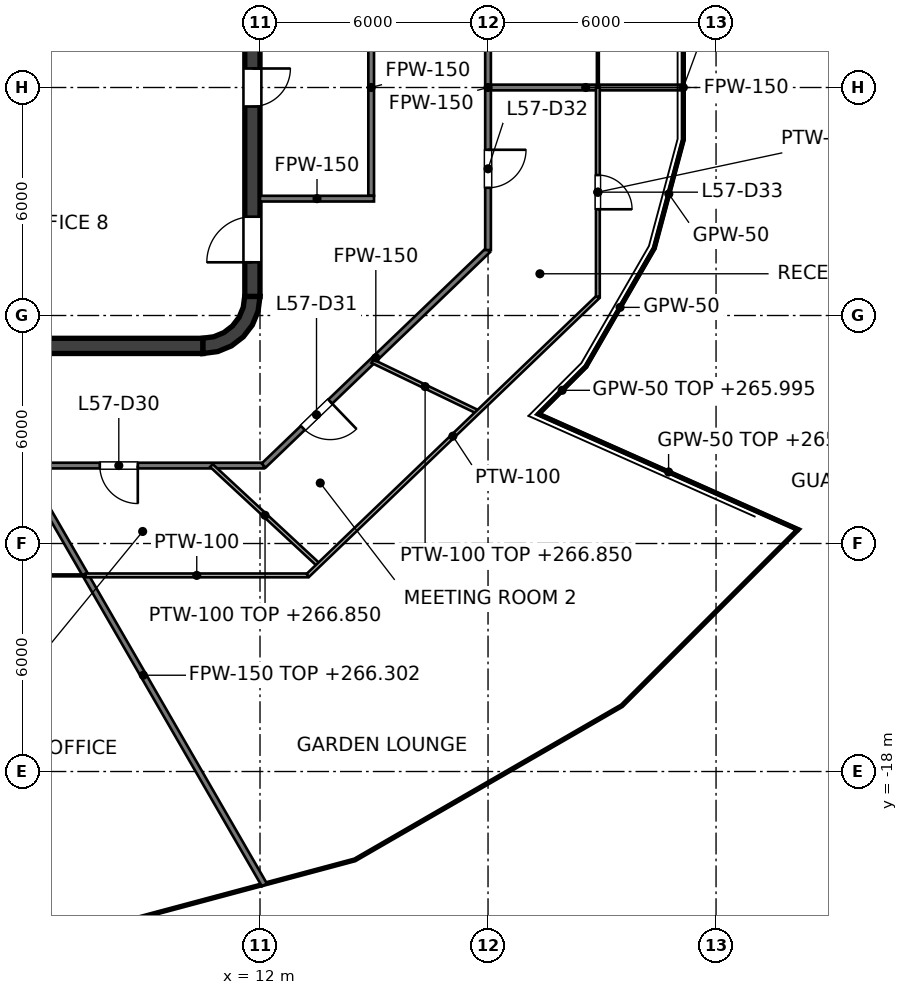
"""IFC4 building model, lengths in metres.
Left out: names, types, materials, properties, quantities, classifications, styles, units other than length and angle.
Written with IfcOpenShell. Run it as: python <this file> out.ifc"""

import sys

from ifc_helpers import new_model, si_unit, direction, frame, frame_2d, origin, place, context, subcontext, project, spatial, polyline, rectangle, outline, extrude, element, fill, save


model = new_model("IFC4")
c1 = context("Model", 3, precision=1e-05, world=origin(), true_north=direction((0.0, 1.0)))
c2 = subcontext(c1, "Body", "Model", "MODEL_VIEW")
j1 = project(units=[si_unit("LENGTHUNIT", "METRE"), si_unit("PLANEANGLEUNIT", "RADIAN")], contexts=[c1])
p1 = place(None, origin())
s1 = spatial("IfcSite", under=j1, at=p1, CompositionType="ELEMENT")
p2 = place(p1, origin())
s2 = spatial("IfcBuilding", under=s1, at=p2, CompositionType="ELEMENT")
p3 = place(p2, frame((0.0, 0.0, 263.0)))
s3 = spatial("IfcBuildingStorey", under=s2, at=p3, CompositionType="ELEMENT", Elevation=263.0)
p4 = place(p3, frame((-10.5, -6.8, 0.0), z_axis=(0.0, 0.0, 1.0), x_axis=(1.0, 0.0, 0.0)))
e1 = element("IfcWall", 1, at=p4, inside=s3, PredefinedType="SHEAR", context=c2, shape_type="SweptSolid", body=[
    extrude(rectangle(XDim=21.0, YDim=0.4, at=frame_2d((10.5, 0.0))), origin(), (0.0, 0.0, 1.0), 4.0),
])
p5 = place(p3, frame((11.8, -5.5, 0.0), z_axis=(0.0, 0.0, 1.0), x_axis=(0.0, 1.0, 0.0)))
e2 = element("IfcWall", 2, at=p5, inside=s3, PredefinedType="SHEAR", context=c2, shape_type="SweptSolid", body=[
    extrude(rectangle(XDim=11.0, YDim=0.4, at=frame_2d((5.5, 0.0))), origin(), (0.0, 0.0, 1.0), 4.0),
])
p6 = place(p5, frame((5.0, 0.0, 0.0)))
e3 = element("IfcOpeningElement", 3, at=p6, cuts=e2, PredefinedType="OPENING", context=c2, shape_type="SweptSolid", body=[
    extrude(rectangle(XDim=1.0, YDim=2.1, at=frame_2d((0.5, 1.05))), frame((0.0, 0.2, 0.0), z_axis=(0.0, -1.0, 0.0), x_axis=(1.0, 0.0, 0.0)), (0.0, 0.0, 1.0), 0.4),
])
p7 = place(p5, frame((0.9, 0.0, 0.0)))
e4 = element("IfcOpeningElement", 4, at=p7, cuts=e2, PredefinedType="OPENING", context=c2, shape_type="SweptSolid", body=[
    extrude(rectangle(XDim=1.2, YDim=2.1, at=frame_2d((0.6, 1.05))), frame((0.0, 0.2, 0.0), z_axis=(0.0, -1.0, 0.0), x_axis=(1.0, 0.0, 0.0)), (0.0, 0.0, 1.0), 0.4),
])
p8 = place(p5, frame((8.9, 0.0, 0.0)))
e5 = element("IfcOpeningElement", 5, at=p8, cuts=e2, PredefinedType="OPENING", context=c2, shape_type="SweptSolid", body=[
    extrude(rectangle(XDim=1.2, YDim=2.1, at=frame_2d((0.6, 1.05))), frame((0.0, 0.2, 0.0), z_axis=(0.0, -1.0, 0.0), x_axis=(1.0, 0.0, 0.0)), (0.0, 0.0, 1.0), 0.4),
])
p9 = place(p3, origin())
e6 = element("IfcWall", 6, at=p9, inside=s3, PredefinedType="SHEAR", context=c2, shape_type="SweptSolid", body=[
    extrude(outline(polyline([(12.0, -5.5), (11.596, -5.5), (11.559, -5.784), (11.45, -6.048), (11.275, -6.275), (11.048, -6.45), (10.784, -6.559), (10.5, -6.596), (10.5, -7.0), (10.888, -6.949), (11.25, -6.799), (11.561, -6.561), (11.799, -6.25), (11.949, -5.888), (12.0, -5.5)])), origin(), (0.0, 0.0, 1.0), 4.0),
])
p10 = place(p3, frame((9.0, -6.6, 0.0), z_axis=(0.0, 0.0, 1.0), x_axis=(0.0, 1.0, 0.0)))
e7 = element("IfcWall", 7, at=p10, inside=s3, PredefinedType="SOLIDWALL", context=c2, shape_type="SweptSolid", body=[
    extrude(rectangle(XDim=2.5, YDim=0.25, at=frame_2d((1.25, 0.0))), origin(), (0.0, 0.0, 1.0), 3.85),
])
p11 = place(p10, frame((0.65, 0.0, 0.0)))
e8 = element("IfcOpeningElement", 8, at=p11, cuts=e7, PredefinedType="OPENING", context=c2, shape_type="SweptSolid", body=[
    extrude(rectangle(XDim=1.2, YDim=2.1, at=frame_2d((0.6, 1.05))), frame((0.0, 0.125, 0.0), z_axis=(0.0, -1.0, 0.0), x_axis=(1.0, 0.0, 0.0)), (0.0, 0.0, 1.0), 0.25),
])
p12 = place(p3, frame((-9.125, -1.525, 0.0), z_axis=(0.0, 0.0, 1.0), x_axis=(1.0, 0.0, 0.0)))
e9 = element("IfcWall", 9, at=p12, inside=s3, PredefinedType="SOLIDWALL", context=c2, shape_type="SweptSolid", body=[
    extrude(rectangle(XDim=18.25, YDim=0.25, at=frame_2d((9.125, 0.0))), origin(), (0.0, 0.0, 1.0), 3.85),
])
p13 = place(p12, frame((7.15, 0.0, 0.0)))
e10 = element("IfcOpeningElement", 10, at=p13, cuts=e9, PredefinedType="OPENING", context=c2, shape_type="SweptSolid", body=[
    extrude(rectangle(XDim=1.2, YDim=2.1, at=frame_2d((0.6, 1.05))), frame((0.0, 0.125, 0.0), z_axis=(0.0, -1.0, 0.0), x_axis=(1.0, 0.0, 0.0)), (0.0, 0.0, 1.0), 0.25),
])
p14 = place(p12, frame((10.2, 0.0, 0.0)))
e11 = element("IfcOpeningElement", 11, at=p14, cuts=e9, PredefinedType="OPENING", context=c2, shape_type="SweptSolid", body=[
    extrude(rectangle(XDim=1.2, YDim=2.1, at=frame_2d((0.6, 1.05))), frame((0.0, 0.125, 0.0), z_axis=(0.0, -1.0, 0.0), x_axis=(1.0, 0.0, 0.0)), (0.0, 0.0, 1.0), 0.25),
])
p15 = place(p12, frame((16.075, 0.0, 0.0)))
e12 = element("IfcOpeningElement", 12, at=p15, cuts=e9, PredefinedType="OPENING", context=c2, shape_type="SweptSolid", body=[
    extrude(rectangle(XDim=1.0, YDim=2.1, at=frame_2d((0.5, 1.05))), frame((0.0, 0.125, 0.0), z_axis=(0.0, -1.0, 0.0), x_axis=(1.0, 0.0, 0.0)), (0.0, 0.0, 1.0), 0.25),
])
p16 = place(p3, frame((3.275, -3.975, 0.0), z_axis=(0.0, 0.0, 1.0), x_axis=(1.0, 0.0, 0.0)))
e13 = element("IfcWall", 13, at=p16, inside=s3, PredefinedType="SOLIDWALL", context=c2, shape_type="SweptSolid", body=[
    extrude(rectangle(XDim=5.85, YDim=0.25, at=frame_2d((2.925, 0.0))), origin(), (0.0, 0.0, 1.0), 3.85),
])
p17 = place(p3, frame((9.0, -3.85, 0.0), z_axis=(0.0, 0.0, 1.0), x_axis=(0.0, 1.0, 0.0)))
e14 = element("IfcWall", 14, at=p17, inside=s3, PredefinedType="SOLIDWALL", context=c2, shape_type="SweptSolid", body=[
    extrude(rectangle(XDim=2.2, YDim=0.25, at=frame_2d((1.1, 0.0))), origin(), (0.0, 0.0, 1.0), 3.85),
])
p18 = place(p3, frame((14.925, -2.85, 0.0), z_axis=(0.0, 0.0, 1.0), x_axis=(0.0, 1.0, 0.0)))
e15 = element("IfcWall", 15, at=p18, inside=s3, PredefinedType="PARTITIONING", context=c2, shape_type="SweptSolid", body=[
    extrude(rectangle(XDim=5.7, YDim=0.15, at=frame_2d((2.85, 0.0))), origin(), (0.0, 0.0, 1.0), 2.918),
])
p19 = place(p3, frame((12.0, -2.925, 0.0), z_axis=(0.0, 0.0, 1.0), x_axis=(1.0, 0.0, 0.0)))
e16 = element("IfcWall", 16, at=p19, inside=s3, PredefinedType="PARTITIONING", context=c2, shape_type="SweptSolid", body=[
    extrude(rectangle(XDim=3.0, YDim=0.15, at=frame_2d((1.5, 0.0))), origin(), (0.0, 0.0, 1.0), 2.918),
])
p20 = place(p3, frame((5.744, -9.949, 0.0), z_axis=(0.0, 0.0, 1.0), x_axis=(0.500041996576, -0.866001155692, 0.0)))
e17 = element("IfcWall", 17, at=p20, inside=s3, PredefinedType="PARTITIONING", context=c2, shape_type="SweptSolid", body=[
    extrude(rectangle(XDim=12.742, YDim=0.15, at=frame_2d((6.371, 0.0))), origin(), (0.0, 0.0, 1.0), 3.302),
])
p21 = place(p3, frame((-12.095, -9.949, 0.0), z_axis=(0.0, 0.0, 1.0), x_axis=(1.0, 0.0, 0.0)))
e18 = element("IfcWall", 18, at=p21, inside=s3, PredefinedType="PARTITIONING", context=c2, shape_type="SweptSolid", body=[
    extrude(rectangle(XDim=24.19, YDim=0.15, at=frame_2d((12.095, 0.0))), origin(), (0.0, 0.0, 1.0), 2.927),
])
p22 = place(p21, frame((0.573, 0.0, 0.0)))
e19 = element("IfcOpeningElement", 19, at=p22, cuts=e18, PredefinedType="OPENING", context=c2, shape_type="SweptSolid", body=[
    extrude(rectangle(XDim=1.0, YDim=2.1, at=frame_2d((0.5, 1.05))), frame((0.0, 0.075, 0.0), z_axis=(0.0, -1.0, 0.0), x_axis=(1.0, 0.0, 0.0)), (0.0, 0.0, 1.0), 0.15),
])
p23 = place(p21, frame((5.966, 0.0, 0.0)))
e20 = element("IfcOpeningElement", 20, at=p23, cuts=e18, PredefinedType="OPENING", context=c2, shape_type="SweptSolid", body=[
    extrude(rectangle(XDim=1.0, YDim=2.1, at=frame_2d((0.5, 1.05))), frame((0.0, 0.075, 0.0), z_axis=(0.0, -1.0, 0.0), x_axis=(1.0, 0.0, 0.0)), (0.0, 0.0, 1.0), 0.15),
])
p24 = place(p21, frame((13.812, 0.0, 0.0)))
e21 = element("IfcOpeningElement", 21, at=p24, cuts=e18, PredefinedType="OPENING", context=c2, shape_type="SweptSolid", body=[
    extrude(rectangle(XDim=1.0, YDim=2.1, at=frame_2d((0.5, 1.05))), frame((0.0, 0.075, 0.0), z_axis=(0.0, -1.0, 0.0), x_axis=(1.0, 0.0, 0.0)), (0.0, 0.0, 1.0), 0.15),
])
p25 = place(p21, frame((19.879, 0.0, 0.0)))
e22 = element("IfcOpeningElement", 22, at=p25, cuts=e18, PredefinedType="OPENING", context=c2, shape_type="SweptSolid", body=[
    extrude(rectangle(XDim=1.0, YDim=2.1, at=frame_2d((0.5, 1.05))), frame((0.0, 0.075, 0.0), z_axis=(0.0, -1.0, 0.0), x_axis=(1.0, 0.0, 0.0)), (0.0, 0.0, 1.0), 0.15),
])
p26 = place(p3, frame((18.0, 0.0, 0.0), z_axis=(0.0, 0.0, 1.0), x_axis=(1.0, 0.0, 0.0)))
e23 = element("IfcWall", 23, at=p26, inside=s3, PredefinedType="PARTITIONING", context=c2, shape_type="SweptSolid", body=[
    extrude(rectangle(XDim=5.139, YDim=0.15, at=frame_2d((2.569, 0.0))), origin(), (0.0, 0.0, 1.0), 2.918),
])
p27 = place(p3, frame((12.095, -9.949, 0.0), z_axis=(0.0, 0.0, 1.0), x_axis=(0.721260976692, 0.69266341285, 0.0)))
e24 = element("IfcWall", 24, at=p27, inside=s3, PredefinedType="PARTITIONING", context=c2, shape_type="SweptSolid", body=[
    extrude(rectangle(XDim=8.187, YDim=0.15, at=frame_2d((4.094, 0.0))), origin(), (0.0, 0.0, 1.0), 2.918),
])
p28 = place(p27, frame((1.43, 0.0, 0.0)))
e25 = element("IfcOpeningElement", 25, at=p28, cuts=e24, PredefinedType="OPENING", context=c2, shape_type="SweptSolid", body=[
    extrude(rectangle(XDim=1.0, YDim=2.1, at=frame_2d((0.5, 1.05))), frame((0.0, 0.075, 0.0), z_axis=(0.0, -1.0, 0.0), x_axis=(1.0, 0.0, 0.0)), (0.0, 0.0, 1.0), 0.15),
])
p29 = place(p3, frame((18.0, -4.278, 0.0), z_axis=(0.0, 0.0, 1.0), x_axis=(0.0, 1.0, 0.0)))
e26 = element("IfcWall", 26, at=p29, inside=s3, PredefinedType="PARTITIONING", context=c2, shape_type="SweptSolid", body=[
    extrude(rectangle(XDim=8.556, YDim=0.15, at=frame_2d((4.278, 0.0))), origin(), (0.0, 0.0, 1.0), 2.918),
])
p30 = place(p29, frame((1.639, 0.0, 0.0)))
e27 = element("IfcOpeningElement", 27, at=p30, cuts=e26, PredefinedType="OPENING", context=c2, shape_type="SweptSolid", body=[
    extrude(rectangle(XDim=1.0, YDim=2.1, at=frame_2d((0.5, 1.05))), frame((0.0, 0.075, 0.0), z_axis=(0.0, -1.0, 0.0), x_axis=(1.0, 0.0, 0.0)), (0.0, 0.0, 1.0), 0.15),
])
p31 = place(p29, frame((5.917, 0.0, 0.0)))
e28 = element("IfcOpeningElement", 28, at=p31, cuts=e26, PredefinedType="OPENING", context=c2, shape_type="SweptSolid", body=[
    extrude(rectangle(XDim=1.0, YDim=2.1, at=frame_2d((0.5, 1.05))), frame((0.0, 0.075, 0.0), z_axis=(0.0, -1.0, 0.0), x_axis=(1.0, 0.0, 0.0)), (0.0, 0.0, 1.0), 0.15),
])
p32 = place(p3, frame((19.325, -8.594, 0.0), z_axis=(0.0, 0.0, 1.0), x_axis=(0.913724263299, -0.406334801191, 0.0)))
e29 = element("IfcWall", 29, at=p32, inside=s3, PredefinedType="PARTITIONING", context=c2, shape_type="SweptSolid", body=[
    extrude(rectangle(XDim=7.499, YDim=0.05, at=frame_2d((3.75, 0.0))), origin(), (0.0, 0.0, 1.0), 2.995),
])
p33 = place(p3, frame((-12.839, -12.839, 0.0), z_axis=(0.0, 0.0, 1.0), x_axis=(1.0, 0.0, 0.0)))
e30 = element("IfcWall", 30, at=p33, inside=s3, PredefinedType="PARTITIONING", context=c2, shape_type="SweptSolid", body=[
    extrude(rectangle(XDim=20.252, YDim=0.05, at=frame_2d((10.126, 0.0))), origin(), (0.0, 0.0, 1.0), 2.927),
])
p34 = place(p33, frame((5.024, 0.0, 0.0)))
e31 = element("IfcOpeningElement", 31, at=p34, cuts=e30, PredefinedType="OPENING", context=c2, shape_type="SweptSolid", body=[
    extrude(rectangle(XDim=1.0, YDim=2.1, at=frame_2d((0.5, 1.05))), frame((0.0, 0.025, 0.0), z_axis=(0.0, -1.0, 0.0), x_axis=(1.0, 0.0, 0.0)), (0.0, 0.0, 1.0), 0.05),
])
p35 = place(p33, frame((16.045, 0.0, 0.0)))
e32 = element("IfcOpeningElement", 32, at=p35, cuts=e30, PredefinedType="OPENING", context=c2, shape_type="SweptSolid", body=[
    extrude(rectangle(XDim=1.0, YDim=2.1, at=frame_2d((0.5, 1.05))), frame((0.0, 0.025, 0.0), z_axis=(0.0, -1.0, 0.0), x_axis=(1.0, 0.0, 0.0)), (0.0, 0.0, 1.0), 0.05),
])
p36 = place(p3, frame((19.325, -8.594, 0.0), z_axis=(0.0, 0.0, 1.0), x_axis=(0.707106781187, 0.707106781187, 0.0)))
e33 = element("IfcWall", 33, at=p36, inside=s3, PredefinedType="PARTITIONING", context=c2, shape_type="SweptSolid", body=[
    extrude(rectangle(XDim=1.769, YDim=0.05, at=frame_2d((0.885, 0.0))), origin(), (0.0, 0.0, 1.0), 2.995),
])
p37 = place(p3, frame((20.576, -7.343, 0.0), z_axis=(0.0, 0.0, 1.0), x_axis=(0.500045691691, 0.865999022067, 0.0)))
e34 = element("IfcWall", 34, at=p37, inside=s3, PredefinedType="PARTITIONING", context=c2, shape_type="SweptSolid", body=[
    extrude(rectangle(XDim=3.596, YDim=0.05, at=frame_2d((1.798, 0.0))), origin(), (0.0, 0.0, 1.0), 2.918),
])
p38 = place(p3, frame((22.374, -4.229, 0.0), z_axis=(0.0, 0.0, 1.0), x_axis=(0.258871000297, 0.965911903439, 0.0)))
e35 = element("IfcWall", 35, at=p38, inside=s3, PredefinedType="PARTITIONING", context=c2, shape_type="SweptSolid", body=[
    extrude(rectangle(XDim=2.955, YDim=0.05, at=frame_2d((1.478, 0.0))), origin(), (0.0, 0.0, 1.0), 2.918),
])
p39 = place(p3, frame((23.139, -1.375, 0.0), z_axis=(0.0, 0.0, 1.0), x_axis=(0.0, 1.0, 0.0)))
e36 = element("IfcWall", 36, at=p39, inside=s3, PredefinedType="PARTITIONING", context=c2, shape_type="SweptSolid", body=[
    extrude(rectangle(XDim=2.75, YDim=0.05, at=frame_2d((1.375, 0.0))), origin(), (0.0, 0.0, 1.0), 2.918),
])
p40 = place(p3, frame((20.89, 0.0, 0.0), z_axis=(0.0, 0.0, 1.0), x_axis=(0.0, 1.0, 0.0)))
e37 = element("IfcWall", 37, at=p40, inside=s3, PredefinedType="PARTITIONING", context=c2, shape_type="SweptSolid", body=[
    extrude(rectangle(XDim=5.509, YDim=0.05, at=frame_2d((2.754, 0.0))), origin(), (0.0, 0.0, 1.0), 2.918),
])
p41 = place(p40, frame((2.204, 0.0, 0.0)))
e38 = element("IfcOpeningElement", 38, at=p41, cuts=e37, PredefinedType="OPENING", context=c2, shape_type="SweptSolid", body=[
    extrude(rectangle(XDim=1.0, YDim=2.1, at=frame_2d((0.5, 1.05))), frame((0.0, 0.025, 0.0), z_axis=(0.0, -1.0, 0.0), x_axis=(1.0, 0.0, 0.0)), (0.0, 0.0, 1.0), 0.05),
])
p42 = place(p3, frame((10.722, -9.949, 0.0), z_axis=(0.0, 0.0, 1.0), x_axis=(0.733130105592, -0.680088412102, 0.0)))
e39 = element("IfcWall", 39, at=p42, inside=s3, PredefinedType="PARTITIONING", context=c2, shape_type="SweptSolid", body=[
    extrude(rectangle(XDim=3.848, YDim=0.1, at=frame_2d((1.924, 0.0))), origin(), (0.0, 0.0, 1.0), 3.85),
])
p43 = place(p3, frame((14.955, -7.202, 0.0), z_axis=(0.0, 0.0, 1.0), x_axis=(0.900977603602, -0.433865598783, 0.0)))
e40 = element("IfcWall", 40, at=p43, inside=s3, PredefinedType="PARTITIONING", context=c2, shape_type="SweptSolid", body=[
    extrude(rectangle(XDim=3.084, YDim=0.1, at=frame_2d((1.542, 0.0))), origin(), (0.0, 0.0, 1.0), 3.85),
])
p44 = place(p3, frame((7.413, -12.839, 0.0), z_axis=(0.0, 0.0, 1.0), x_axis=(1.0, 0.0, 0.0)))
e41 = element("IfcWall", 41, at=p44, inside=s3, PredefinedType="PARTITIONING", context=c2, shape_type="SweptSolid", body=[
    extrude(rectangle(XDim=5.845, YDim=0.1, at=frame_2d((2.922, 0.0))), origin(), (0.0, 0.0, 1.0), 2.927),
])
p45 = place(p3, frame((13.258, -12.839, 0.0), z_axis=(0.0, 0.0, 1.0), x_axis=(0.721435728401, 0.692481400318, 0.0)))
e42 = element("IfcWall", 42, at=p45, inside=s3, PredefinedType="PARTITIONING", context=c2, shape_type="SweptSolid", body=[
    extrude(rectangle(XDim=10.582, YDim=0.1, at=frame_2d((5.291, 0.0))), origin(), (0.0, 0.0, 1.0), 2.927),
])
p46 = place(p3, frame((20.89, -5.509, 0.0), z_axis=(0.0, 0.0, 1.0), x_axis=(0.0, 1.0, 0.0)))
e43 = element("IfcWall", 43, at=p46, inside=s3, PredefinedType="PARTITIONING", context=c2, shape_type="SweptSolid", body=[
    extrude(rectangle(XDim=5.509, YDim=0.1, at=frame_2d((2.754, 0.0))), origin(), (0.0, 0.0, 1.0), 2.918),
])
p47 = place(p46, frame((2.304, 0.0, 0.0)))
e44 = element("IfcOpeningElement", 44, at=p47, cuts=e43, PredefinedType="OPENING", context=c2, shape_type="SweptSolid", body=[
    extrude(rectangle(XDim=0.9, YDim=2.1, at=frame_2d((0.45, 1.05))), frame((0.0, 0.05, 0.0), z_axis=(0.0, -1.0, 0.0), x_axis=(1.0, 0.0, 0.0)), (0.0, 0.0, 1.0), 0.1),
])
p48 = place(p11, origin())
e45 = element("IfcDoor", 45, at=p48, inside=s3, OperationType="SINGLE_SWING_LEFT", PredefinedType="DOOR", context=c2, shape_type="SweptSolid", body=[
    extrude(rectangle(XDim=1.2, YDim=2.1, at=frame_2d((0.6, 1.05))), frame((0.0, 0.025, 0.0), z_axis=(0.0, -1.0, 0.0), x_axis=(1.0, 0.0, 0.0)), (0.0, 0.0, 1.0), 0.05),
])
fill(e8, e45)
p49 = place(p15, origin())
e46 = element("IfcDoor", 46, at=p49, inside=s3, OperationType="SINGLE_SWING_RIGHT", PredefinedType="DOOR", context=c2, shape_type="SweptSolid", body=[
    extrude(rectangle(XDim=1.0, YDim=2.1, at=frame_2d((0.5, 1.05))), frame((0.0, 0.025, 0.0), z_axis=(0.0, -1.0, 0.0), x_axis=(1.0, 0.0, 0.0)), (0.0, 0.0, 1.0), 0.05),
])
fill(e12, e46)
p50 = place(p6, origin())
e47 = element("IfcDoor", 47, at=p50, inside=s3, OperationType="SINGLE_SWING_RIGHT", PredefinedType="DOOR", context=c2, shape_type="SweptSolid", body=[
    extrude(rectangle(XDim=1.0, YDim=2.1, at=frame_2d((0.5, 1.05))), frame((0.0, 0.025, 0.0), z_axis=(0.0, -1.0, 0.0), x_axis=(1.0, 0.0, 0.0)), (0.0, 0.0, 1.0), 0.05),
])
fill(e3, e47)
p51 = place(p7, origin())
e48 = element("IfcDoor", 48, at=p51, inside=s3, OperationType="SINGLE_SWING_LEFT", PredefinedType="DOOR", context=c2, shape_type="SweptSolid", body=[
    extrude(rectangle(XDim=1.2, YDim=2.1, at=frame_2d((0.6, 1.05))), frame((0.0, 0.025, 0.0), z_axis=(0.0, -1.0, 0.0), x_axis=(1.0, 0.0, 0.0)), (0.0, 0.0, 1.0), 0.05),
])
fill(e4, e48)
p52 = place(p25, origin())
e49 = element("IfcDoor", 49, at=p52, inside=s3, OperationType="SINGLE_SWING_RIGHT", PredefinedType="DOOR", context=c2, shape_type="SweptSolid", body=[
    extrude(rectangle(XDim=1.0, YDim=2.1, at=frame_2d((0.5, 1.05))), frame((0.0, 0.025, 0.0), z_axis=(0.0, -1.0, 0.0), x_axis=(1.0, 0.0, 0.0)), (0.0, 0.0, 1.0), 0.05),
])
fill(e22, e49)
p53 = place(p28, origin())
e50 = element("IfcDoor", 50, at=p53, inside=s3, OperationType="SINGLE_SWING_RIGHT", PredefinedType="DOOR", context=c2, shape_type="SweptSolid", body=[
    extrude(rectangle(XDim=1.0, YDim=2.1, at=frame_2d((0.5, 1.05))), frame((0.0, 0.025, 0.0), z_axis=(0.0, -1.0, 0.0), x_axis=(1.0, 0.0, 0.0)), (0.0, 0.0, 1.0), 0.05),
])
fill(e25, e50)
p54 = place(p30, origin())
e51 = element("IfcDoor", 51, at=p54, inside=s3, OperationType="SINGLE_SWING_RIGHT", PredefinedType="DOOR", context=c2, shape_type="SweptSolid", body=[
    extrude(rectangle(XDim=1.0, YDim=2.1, at=frame_2d((0.5, 1.05))), frame((0.0, 0.025, 0.0), z_axis=(0.0, -1.0, 0.0), x_axis=(1.0, 0.0, 0.0)), (0.0, 0.0, 1.0), 0.05),
])
fill(e27, e51)
p55 = place(p47, origin())
e52 = element("IfcDoor", 52, at=p55, inside=s3, OperationType="SINGLE_SWING_LEFT", PredefinedType="DOOR", context=c2, shape_type="SweptSolid", body=[
    extrude(rectangle(XDim=0.9, YDim=2.1, at=frame_2d((0.45, 1.05))), frame((0.0, 0.025, 0.0), z_axis=(0.0, -1.0, 0.0), x_axis=(1.0, 0.0, 0.0)), (0.0, 0.0, 1.0), 0.05),
])
fill(e44, e52)
save(model, sys.argv[1])
